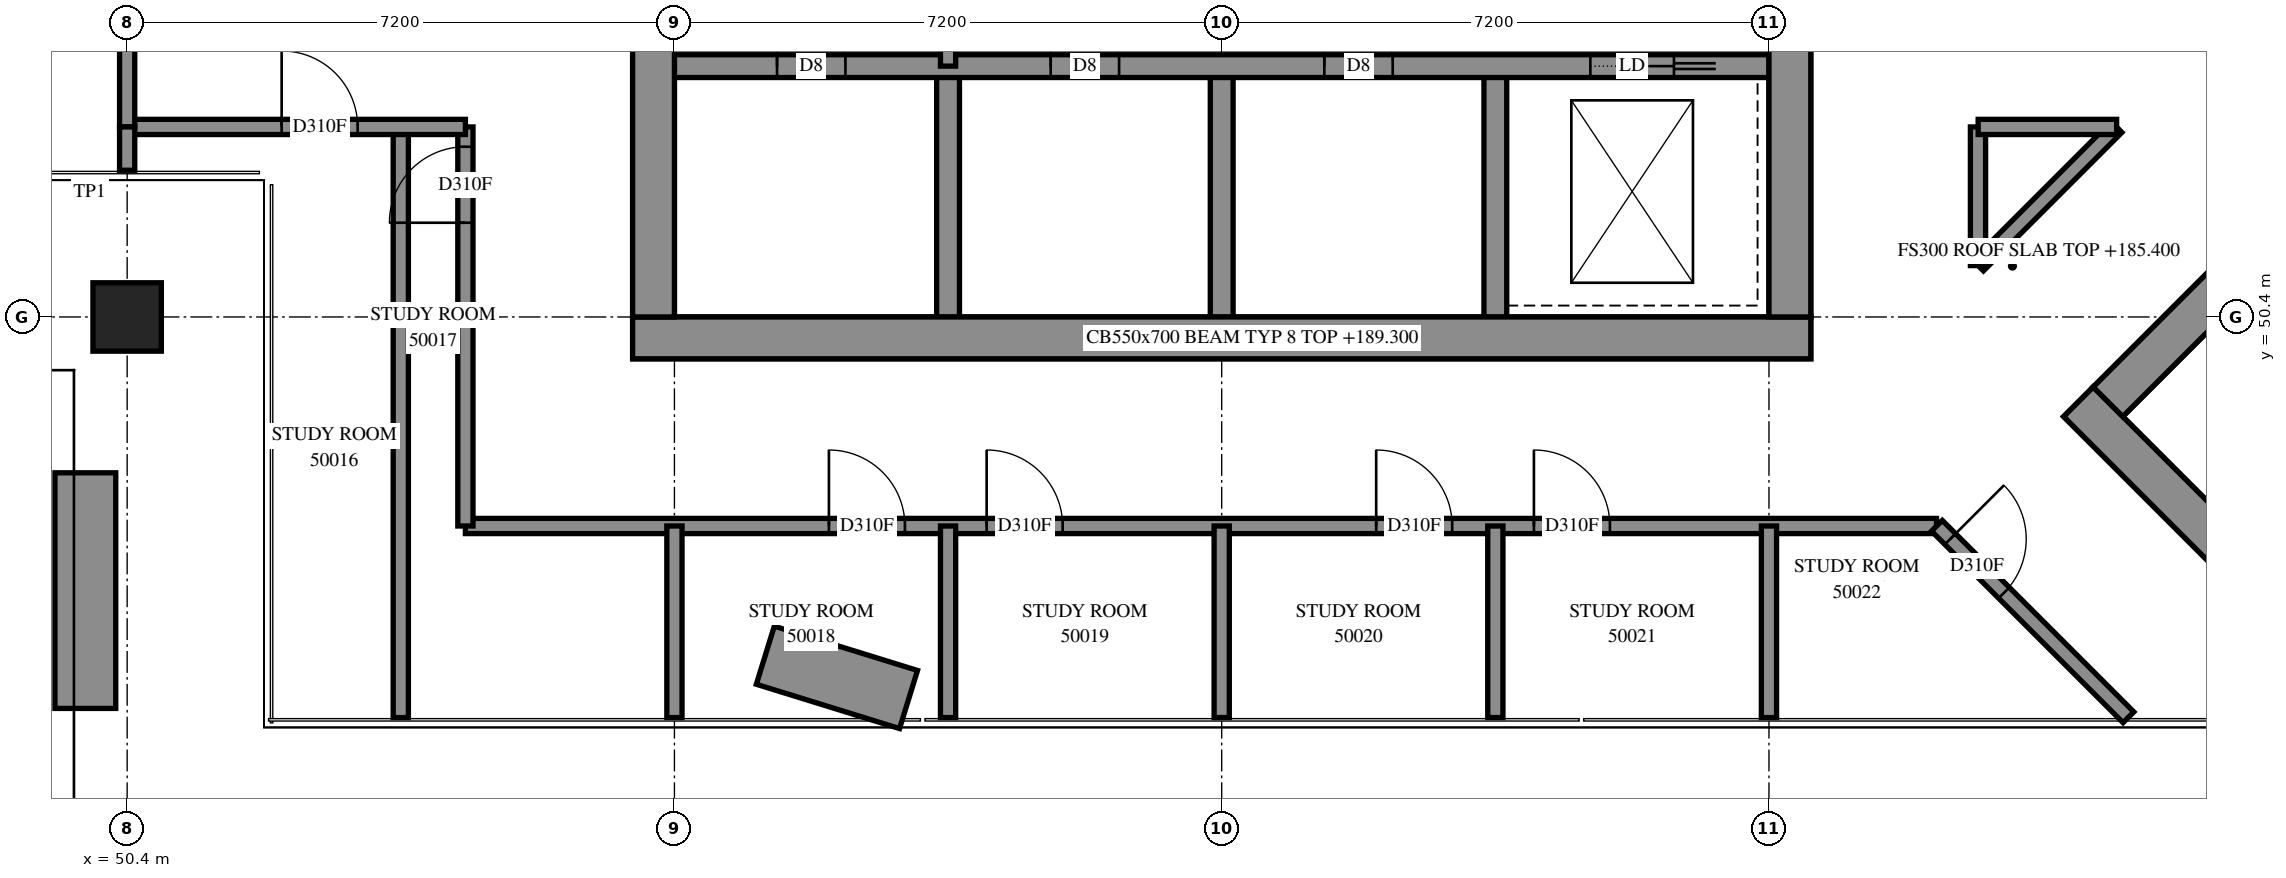
"""IFC4 building model, lengths in metres.
Left out: names, types, materials, properties, quantities, classifications, styles, units other than length and angle.
Written with IfcOpenShell. Run it as: python <this file> out.ifc"""

import sys

from ifc_helpers import new_model, si_unit, direction, frame, frame_2d, origin, origin_2d, place, context, subcontext, project, spatial, rectangle, extrude, element, fill, save


model = new_model("IFC4")
c1 = context("Model", 3, precision=1e-05, world=origin(), true_north=direction((0.0, 1.0)))
c2 = subcontext(c1, "Body", "Model", "MODEL_VIEW")
j1 = project(units=[si_unit("LENGTHUNIT", "METRE"), si_unit("PLANEANGLEUNIT", "RADIAN")], contexts=[c1])
p1 = place(None, origin())
s1 = spatial("IfcSite", under=j1, at=p1, CompositionType="ELEMENT")
p2 = place(p1, origin())
s2 = spatial("IfcBuilding", under=s1, at=p2, CompositionType="ELEMENT")
p3 = place(p2, frame((0.0, 0.0, 185.4)))
s3 = spatial("IfcBuildingStorey", under=s2, at=p3, CompositionType="ELEMENT", Elevation=185.4)
p4 = place(p3, frame((50.4, 50.4, 0.0), z_axis=(0.0, 0.0, 1.0), x_axis=(1.0, 0.0, 0.0)))
e1 = element("IfcColumn", 1, at=p4, inside=s3, PredefinedType="COLUMN", context=c2, shape_type="SweptSolid", body=[
    extrude(rectangle(XDim=0.9, YDim=0.9, at=origin_2d()), origin(), (0.0, 0.0, 1.0), 3.9),
])
p5 = place(p3, frame((57.05, 50.125, -0.3), z_axis=(0.0, 0.0, 1.0), x_axis=(1.0, 0.0, 0.0)))
e2 = element("IfcWall", 2, at=p5, inside=s3, PredefinedType="SHEAR", context=c2, shape_type="SweptSolid", body=[
    extrude(rectangle(XDim=15.5, YDim=0.55, at=frame_2d((7.75, 0.0))), origin(), (0.0, 0.0, 1.0), 3.5),
])
p6 = place(p3, frame((57.325, 50.4, -0.3), z_axis=(0.0, 0.0, 1.0), x_axis=(0.0, 1.0, 0.0)))
e3 = element("IfcWall", 3, at=p6, inside=s3, PredefinedType="SHEAR", context=c2, shape_type="SweptSolid", body=[
    extrude(rectangle(XDim=14.4, YDim=0.55, at=frame_2d((7.2, 0.0))), origin(), (0.0, 0.0, 1.0), 3.5),
])
p7 = place(p6, frame((4.55, 0.0, 0.3)))
e4 = element("IfcOpeningElement", 4, at=p7, cuts=e3, PredefinedType="OPENING", context=c2, shape_type="SweptSolid", body=[
    extrude(rectangle(XDim=1.1, YDim=2.1, at=frame_2d((0.55, 1.05))), frame((0.0, 0.285, 0.0), z_axis=(0.0, -1.0, 0.0), x_axis=(1.0, 0.0, 0.0)), (0.0, 0.0, 1.0), 0.57),
])
p8 = place(p6, frame((11.35, 0.0, 0.3)))
e5 = element("IfcOpeningElement", 5, at=p8, cuts=e3, PredefinedType="OPENING", context=c2, shape_type="SweptSolid", body=[
    extrude(rectangle(XDim=1.1, YDim=2.1, at=frame_2d((0.55, 1.05))), frame((0.0, 0.285, 0.0), z_axis=(0.0, -1.0, 0.0), x_axis=(1.0, 0.0, 0.0)), (0.0, 0.0, 1.0), 0.57),
])
p9 = place(p3, frame((72.275, 50.4, -0.3), z_axis=(0.0, 0.0, 1.0), x_axis=(0.0, 1.0, 0.0)))
e6 = element("IfcWall", 6, at=p9, inside=s3, PredefinedType="SHEAR", context=c2, shape_type="SweptSolid", body=[
    extrude(rectangle(XDim=14.4, YDim=0.55, at=frame_2d((7.2, 0.0))), origin(), (0.0, 0.0, 1.0), 3.5),
])
p10 = place(p9, frame((4.55, 0.0, 0.3)))
e7 = element("IfcOpeningElement", 7, at=p10, cuts=e6, PredefinedType="OPENING", context=c2, shape_type="SweptSolid", body=[
    extrude(rectangle(XDim=1.1, YDim=2.1, at=frame_2d((0.55, 1.05))), frame((0.0, 0.285, 0.0), z_axis=(0.0, -1.0, 0.0), x_axis=(1.0, 0.0, 0.0)), (0.0, 0.0, 1.0), 0.57),
])
p11 = place(p9, frame((11.35, 0.0, 0.3)))
e8 = element("IfcOpeningElement", 8, at=p11, cuts=e6, PredefinedType="OPENING", context=c2, shape_type="SweptSolid", body=[
    extrude(rectangle(XDim=1.1, YDim=2.1, at=frame_2d((0.55, 1.05))), frame((0.0, 0.285, 0.0), z_axis=(0.0, -1.0, 0.0), x_axis=(1.0, 0.0, 0.0)), (0.0, 0.0, 1.0), 0.57),
])
for number, where, z_axis, x_axis in (
    (9, (61.2, 50.4, 0.0), (0.0, 0.0, 1.0), (0.0, 1.0, 0.0)),
    (10, (64.8, 50.4, 0.0), (0.0, 0.0, 1.0), (0.0, 1.0, 0.0)),
    (11, (68.4, 50.4, 0.0), (0.0, 0.0, 1.0), (0.0, 1.0, 0.0)),
):
    element("IfcWall", number, at=place(p3, frame(where, z_axis=z_axis, x_axis=x_axis)), inside=s3, PredefinedType="SOLIDWALL", context=c2, shape_type="SweptSolid", body=[
        extrude(rectangle(XDim=3.3, YDim=0.3, at=frame_2d((1.65, 0.0))), origin(), (0.0, 0.0, 1.0), 3.9),
    ])
p12 = place(p3, frame((57.6, 53.7, 0.0), z_axis=(0.0, 0.0, 1.0), x_axis=(1.0, 0.0, 0.0)))
e12 = element("IfcWall", 12, at=p12, inside=s3, PredefinedType="SOLIDWALL", context=c2, shape_type="SweptSolid", body=[
    extrude(rectangle(XDim=14.4, YDim=0.3, at=frame_2d((7.2, 0.0))), origin(), (0.0, 0.0, 1.0), 3.9),
])
p13 = place(p12, frame((1.35, 0.0, 0.0)))
e13 = element("IfcOpeningElement", 13, at=p13, cuts=e12, PredefinedType="OPENING", context=c2, shape_type="SweptSolid", body=[
    extrude(rectangle(XDim=0.9, YDim=2.1, at=frame_2d((0.45, 1.05))), frame((0.0, 0.16, 0.0), z_axis=(0.0, -1.0, 0.0), x_axis=(1.0, 0.0, 0.0)), (0.0, 0.0, 1.0), 0.32),
])
p14 = place(p12, frame((4.95, 0.0, 0.0)))
e14 = element("IfcOpeningElement", 14, at=p14, cuts=e12, PredefinedType="OPENING", context=c2, shape_type="SweptSolid", body=[
    extrude(rectangle(XDim=0.9, YDim=2.1, at=frame_2d((0.45, 1.05))), frame((0.0, 0.16, 0.0), z_axis=(0.0, -1.0, 0.0), x_axis=(1.0, 0.0, 0.0)), (0.0, 0.0, 1.0), 0.32),
])
p15 = place(p12, frame((8.55, 0.0, 0.0)))
e15 = element("IfcOpeningElement", 15, at=p15, cuts=e12, PredefinedType="OPENING", context=c2, shape_type="SweptSolid", body=[
    extrude(rectangle(XDim=0.9, YDim=2.1, at=frame_2d((0.45, 1.05))), frame((0.0, 0.16, 0.0), z_axis=(0.0, -1.0, 0.0), x_axis=(1.0, 0.0, 0.0)), (0.0, 0.0, 1.0), 0.32),
])
p16 = place(p12, frame((12.05, 0.0, 0.0)))
e16 = element("IfcOpeningElement", 16, at=p16, cuts=e12, PredefinedType="OPENING", context=c2, shape_type="SweptSolid", body=[
    extrude(rectangle(XDim=1.1, YDim=2.1, at=frame_2d((0.55, 1.05))), frame((0.0, 0.16, 0.0), z_axis=(0.0, -1.0, 0.0), x_axis=(1.0, 0.0, 0.0)), (0.0, 0.0, 1.0), 0.32),
])
p17 = place(p3, frame((76.071, 49.284, -0.3), z_axis=(0.0, 0.0, 1.0), x_axis=(0.7071035554, -0.707110007, 0.0)))
e17 = element("IfcWall", 17, at=p17, inside=s3, PredefinedType="SHEAR", context=c2, shape_type="SweptSolid", body=[
    extrude(rectangle(XDim=15.5, YDim=0.55, at=frame_2d((7.75, 0.0))), origin(), (0.0, 0.0, 1.0), 3.5),
])
p18 = place(p3, frame((76.46, 49.284, -0.3), z_axis=(0.0, 0.0, 1.0), x_axis=(0.7071067812, 0.7071067812, 0.0)))
e18 = element("IfcWall", 18, at=p18, inside=s3, PredefinedType="SHEAR", context=c2, shape_type="SweptSolid", body=[
    extrude(rectangle(XDim=14.4, YDim=0.55, at=frame_2d((7.2, 0.0))), origin(), (0.0, 0.0, 1.0), 3.5),
])
p19 = place(p18, frame((4.55, 0.0, 0.3)))
e19 = element("IfcOpeningElement", 19, at=p19, cuts=e18, PredefinedType="OPENING", context=c2, shape_type="SweptSolid", body=[
    extrude(rectangle(XDim=1.1, YDim=2.1, at=frame_2d((0.55, 1.05))), frame((0.0, 0.285, 0.0), z_axis=(0.0, -1.0, 0.0), x_axis=(1.0, 0.0, 0.0)), (0.0, 0.0, 1.0), 0.57),
])
p20 = place(p18, frame((11.35, 0.0, 0.3)))
e20 = element("IfcOpeningElement", 20, at=p20, cuts=e18, PredefinedType="OPENING", context=c2, shape_type="SweptSolid", body=[
    extrude(rectangle(XDim=1.1, YDim=2.1, at=frame_2d((0.55, 1.05))), frame((0.0, 0.285, 0.0), z_axis=(0.0, -1.0, 0.0), x_axis=(1.0, 0.0, 0.0)), (0.0, 0.0, 1.0), 0.57),
])
p21 = place(p3, frame((49.85, 48.35, 0.0), z_axis=(0.0, 0.0, 1.0), x_axis=(0.0, -1.0, 0.0)))
e21 = element("IfcWall", 21, at=p21, inside=s3, PredefinedType="SOLIDWALL", context=c2, shape_type="SweptSolid", body=[
    extrude(rectangle(XDim=3.1, YDim=0.8, at=frame_2d((1.55, 0.0))), origin(), (0.0, 0.0, 1.0), 0.65),
])
p22 = place(p3, frame((60.68, 45.367, 0.0), z_axis=(0.0, 0.0, 1.0), x_axis=(-0.9553537272, 0.2954644747, 0.0)))
e22 = element("IfcWall", 22, at=p22, inside=s3, PredefinedType="SOLIDWALL", context=c2, shape_type="SweptSolid", body=[
    extrude(rectangle(XDim=1.972, YDim=0.8, at=frame_2d((0.986, 0.0))), origin(), (0.0, 0.0, 1.0), 0.65),
])
p23 = place(p3, frame((61.2, 53.7, 0.0), z_axis=(0.0, 0.0, 1.0), x_axis=(0.0, 1.0, 0.0)))
e23 = element("IfcWall", 23, at=p23, inside=s3, PredefinedType="PARTITIONING", context=c2, shape_type="SweptSolid", body=[
    extrude(rectangle(XDim=3.6, YDim=0.2, at=frame_2d((1.8, 0.0))), origin(), (0.0, 0.0, 1.0), 3.9),
])
p24 = place(p3, frame((54.85, 47.65, 0.0), z_axis=(0.0, 0.0, 1.0), x_axis=(1.0, 0.0, 0.0)))
e24 = element("IfcWall", 24, at=p24, inside=s3, PredefinedType="PARTITIONING", context=c2, shape_type="SweptSolid", body=[
    extrude(rectangle(XDim=19.354, YDim=0.2, at=frame_2d((9.677, 0.0))), origin(), (0.0, 0.0, 1.0), 3.9),
])
p25 = place(p24, frame((4.782, 0.0, 0.0)))
e25 = element("IfcOpeningElement", 25, at=p25, cuts=e24, PredefinedType="OPENING", context=c2, shape_type="SweptSolid", body=[
    extrude(rectangle(XDim=1.0, YDim=2.1, at=frame_2d((0.5, 1.05))), frame((0.0, 0.11, 0.0), z_axis=(0.0, -1.0, 0.0), x_axis=(1.0, 0.0, 0.0)), (0.0, 0.0, 1.0), 0.22),
])
p26 = place(p24, frame((6.857, 0.0, 0.0)))
e26 = element("IfcOpeningElement", 26, at=p26, cuts=e24, PredefinedType="OPENING", context=c2, shape_type="SweptSolid", body=[
    extrude(rectangle(XDim=1.0, YDim=2.1, at=frame_2d((0.5, 1.05))), frame((0.0, 0.11, 0.0), z_axis=(0.0, -1.0, 0.0), x_axis=(1.0, 0.0, 0.0)), (0.0, 0.0, 1.0), 0.22),
])
p27 = place(p24, frame((11.982, 0.0, 0.0)))
e27 = element("IfcOpeningElement", 27, at=p27, cuts=e24, PredefinedType="OPENING", context=c2, shape_type="SweptSolid", body=[
    extrude(rectangle(XDim=1.0, YDim=2.1, at=frame_2d((0.5, 1.05))), frame((0.0, 0.11, 0.0), z_axis=(0.0, -1.0, 0.0), x_axis=(1.0, 0.0, 0.0)), (0.0, 0.0, 1.0), 0.22),
])
p28 = place(p24, frame((14.057, 0.0, 0.0)))
e28 = element("IfcOpeningElement", 28, at=p28, cuts=e24, PredefinedType="OPENING", context=c2, shape_type="SweptSolid", body=[
    extrude(rectangle(XDim=1.0, YDim=2.1, at=frame_2d((0.5, 1.05))), frame((0.0, 0.11, 0.0), z_axis=(0.0, -1.0, 0.0), x_axis=(1.0, 0.0, 0.0)), (0.0, 0.0, 1.0), 0.22),
])
p29 = place(p3, frame((54.0, 45.13, 0.0), z_axis=(0.0, 0.0, 1.0), x_axis=(0.0, 1.0, 0.0)))
e29 = element("IfcWall", 29, at=p29, inside=s3, PredefinedType="PARTITIONING", context=c2, shape_type="SweptSolid", body=[
    extrude(rectangle(XDim=7.77, YDim=0.2, at=frame_2d((3.885, 0.0))), origin(), (0.0, 0.0, 1.0), 3.9),
])
p30 = place(p3, frame((54.85, 47.65, 0.0), z_axis=(0.0, 0.0, 1.0), x_axis=(0.0, 1.0, 0.0)))
e30 = element("IfcWall", 30, at=p30, inside=s3, PredefinedType="PARTITIONING", context=c2, shape_type="SweptSolid", body=[
    extrude(rectangle(XDim=5.25, YDim=0.2, at=frame_2d((2.625, 0.0))), origin(), (0.0, 0.0, 1.0), 3.9),
])
p31 = place(p30, frame((3.99, 0.0, 0.0)))
e31 = element("IfcOpeningElement", 31, at=p31, cuts=e30, PredefinedType="OPENING", context=c2, shape_type="SweptSolid", body=[
    extrude(rectangle(XDim=1.0, YDim=2.1, at=frame_2d((0.5, 1.05))), frame((0.0, 0.11, 0.0), z_axis=(0.0, -1.0, 0.0), x_axis=(1.0, 0.0, 0.0)), (0.0, 0.0, 1.0), 0.22),
])
p32 = place(p3, frame((50.4, 52.9, 0.0), z_axis=(0.0, 0.0, 1.0), x_axis=(1.0, 0.0, 0.0)))
e32 = element("IfcWall", 32, at=p32, inside=s3, PredefinedType="PARTITIONING", context=c2, shape_type="SweptSolid", body=[
    extrude(rectangle(XDim=4.45, YDim=0.2, at=frame_2d((2.225, 0.0))), origin(), (0.0, 0.0, 1.0), 3.9),
])
p33 = place(p32, frame((2.033, 0.0, 0.0)))
e33 = element("IfcOpeningElement", 33, at=p33, cuts=e32, PredefinedType="OPENING", context=c2, shape_type="SweptSolid", body=[
    extrude(rectangle(XDim=1.0, YDim=2.1, at=frame_2d((0.5, 1.05))), frame((0.0, 0.11, 0.0), z_axis=(0.0, -1.0, 0.0), x_axis=(1.0, 0.0, 0.0)), (0.0, 0.0, 1.0), 0.22),
])
p34 = place(p3, frame((74.209, 47.653, 0.0), z_axis=(0.0, 0.0, 1.0), x_axis=(0.7071067812, -0.7071067812, 0.0)))
e34 = element("IfcWall", 34, at=p34, inside=s3, PredefinedType="PARTITIONING", context=c2, shape_type="SweptSolid", body=[
    extrude(rectangle(XDim=3.564, YDim=0.2, at=frame_2d((1.782, 0.0))), origin(), (0.0, 0.0, 1.0), 3.9),
])
p35 = place(p34, frame((0.248, 0.0, 0.0)))
e35 = element("IfcOpeningElement", 35, at=p35, cuts=e34, PredefinedType="OPENING", context=c2, shape_type="SweptSolid", body=[
    extrude(rectangle(XDim=1.0, YDim=2.1, at=frame_2d((0.5, 1.05))), frame((0.0, 0.11, 0.0), z_axis=(0.0, -1.0, 0.0), x_axis=(1.0, 0.0, 0.0)), (0.0, 0.0, 1.0), 0.22),
])
p36 = place(p3, frame((74.751, 51.077, 0.0), z_axis=(0.0, 0.0, 1.0), x_axis=(0.7071067812, 0.7071067812, 0.0)))
e36 = element("IfcWall", 36, at=p36, inside=s3, PredefinedType="PARTITIONING", context=c2, shape_type="SweptSolid", body=[
    extrude(rectangle(XDim=2.577, YDim=0.2, at=frame_2d((1.288, 0.0))), origin(), (0.0, 0.0, 1.0), 3.9),
])
for number, where, z_axis, x_axis in (
    (37, (57.6, 45.13, 0.0), (0.0, 0.0, 1.0), (0.0, 1.0, 0.0)),
    (38, (61.2, 45.13, 0.0), (0.0, 0.0, 1.0), (0.0, 1.0, 0.0)),
    (39, (64.8, 45.13, 0.0), (0.0, 0.0, 1.0), (0.0, 1.0, 0.0)),
    (40, (68.4, 45.13, 0.0), (0.0, 0.0, 1.0), (0.0, 1.0, 0.0)),
    (41, (72.0, 45.13, 0.0), (0.0, 0.0, 1.0), (0.0, 1.0, 0.0)),
):
    element("IfcWall", number, at=place(p3, frame(where, z_axis=z_axis, x_axis=x_axis)), inside=s3, PredefinedType="PARTITIONING", context=c2, shape_type="SweptSolid", body=[
        extrude(rectangle(XDim=2.52, YDim=0.2, at=frame_2d((1.26, 0.0))), origin(), (0.0, 0.0, 1.0), 3.9),
    ])
p37 = place(p3, frame((50.4, 52.9, 0.0), z_axis=(0.0, 0.0, 1.0), x_axis=(0.0, 1.0, 0.0)))
e42 = element("IfcWall", 42, at=p37, inside=s3, PredefinedType="PARTITIONING", context=c2, shape_type="SweptSolid", body=[
    extrude(rectangle(XDim=2.2, YDim=0.2, at=frame_2d((1.1, 0.0))), origin(), (0.0, 0.0, 1.0), 3.9),
])
p38 = place(p3, frame((74.75, 51.076, 0.0), z_axis=(0.0, 0.0, 1.0), x_axis=(0.0, 1.0, 0.0)))
e43 = element("IfcWall", 43, at=p38, inside=s3, PredefinedType="PARTITIONING", context=c2, shape_type="SweptSolid", body=[
    extrude(rectangle(XDim=1.824, YDim=0.2, at=frame_2d((0.912, 0.0))), origin(), (0.0, 0.0, 1.0), 3.9),
])
p39 = place(p3, frame((74.752, 52.9, 0.0), z_axis=(0.0, 0.0, 1.0), x_axis=(1.0, 0.0, 0.0)))
e44 = element("IfcWall", 44, at=p39, inside=s3, PredefinedType="PARTITIONING", context=c2, shape_type="SweptSolid", body=[
    extrude(rectangle(XDim=1.822, YDim=0.2, at=frame_2d((0.911, 0.0))), origin(), (0.0, 0.0, 1.0), 3.9),
])
p40 = place(p3, frame((50.4, 52.33, 0.0), z_axis=(0.0, 0.0, 1.0), x_axis=(0.0, 1.0, 0.0)))
e45 = element("IfcWall", 45, at=p40, inside=s3, PredefinedType="PARTITIONING", context=c2, shape_type="SweptSolid", body=[
    extrude(rectangle(XDim=0.57, YDim=0.2, at=frame_2d((0.285, 0.0))), origin(), (0.0, 0.0, 1.0), 3.9),
])
p41 = place(p13, origin())
e46 = element("IfcDoor", 46, at=p41, inside=s3, OperationType="SINGLE_SWING_LEFT", PredefinedType="DOOR", context=c2, shape_type="SweptSolid", body=[
    extrude(rectangle(XDim=0.9, YDim=2.1, at=frame_2d((0.45, 1.05))), frame((0.0, 0.025, 0.0), z_axis=(0.0, -1.0, 0.0), x_axis=(1.0, 0.0, 0.0)), (0.0, 0.0, 1.0), 0.05),
])
fill(e13, e46)
p42 = place(p14, origin())
e47 = element("IfcDoor", 47, at=p42, inside=s3, OperationType="SINGLE_SWING_LEFT", PredefinedType="DOOR", context=c2, shape_type="SweptSolid", body=[
    extrude(rectangle(XDim=0.9, YDim=2.1, at=frame_2d((0.45, 1.05))), frame((0.0, 0.025, 0.0), z_axis=(0.0, -1.0, 0.0), x_axis=(1.0, 0.0, 0.0)), (0.0, 0.0, 1.0), 0.05),
])
fill(e14, e47)
p43 = place(p15, origin())
e48 = element("IfcDoor", 48, at=p43, inside=s3, OperationType="SINGLE_SWING_LEFT", PredefinedType="DOOR", context=c2, shape_type="SweptSolid", body=[
    extrude(rectangle(XDim=0.9, YDim=2.1, at=frame_2d((0.45, 1.05))), frame((0.0, 0.025, 0.0), z_axis=(0.0, -1.0, 0.0), x_axis=(1.0, 0.0, 0.0)), (0.0, 0.0, 1.0), 0.05),
])
fill(e15, e48)
p44 = place(p16, origin())
e49 = element("IfcDoor", 49, at=p44, inside=s3, OperationType="SLIDING_TO_RIGHT", PredefinedType="DOOR", context=c2, shape_type="SweptSolid", body=[
    extrude(rectangle(XDim=1.1, YDim=2.1, at=frame_2d((0.55, 1.05))), frame((0.0, 0.025, 0.0), z_axis=(0.0, -1.0, 0.0), x_axis=(1.0, 0.0, 0.0)), (0.0, 0.0, 1.0), 0.05),
])
fill(e16, e49)
p45 = place(p33, origin())
e50 = element("IfcDoor", 50, at=p45, inside=s3, OperationType="SINGLE_SWING_LEFT", PredefinedType="DOOR", context=c2, shape_type="SweptSolid", body=[
    extrude(rectangle(XDim=1.0, YDim=2.1, at=frame_2d((0.5, 1.05))), frame((0.0, 0.025, 0.0), z_axis=(0.0, -1.0, 0.0), x_axis=(1.0, 0.0, 0.0)), (0.0, 0.0, 1.0), 0.05),
])
fill(e33, e50)
p46 = place(p31, origin())
e51 = element("IfcDoor", 51, at=p46, inside=s3, OperationType="SINGLE_SWING_RIGHT", PredefinedType="DOOR", context=c2, shape_type="SweptSolid", body=[
    extrude(rectangle(XDim=1.0, YDim=2.1, at=frame_2d((0.5, 1.05))), frame((0.0, 0.025, 0.0), z_axis=(0.0, -1.0, 0.0), x_axis=(1.0, 0.0, 0.0)), (0.0, 0.0, 1.0), 0.05),
])
fill(e31, e51)
p47 = place(p25, origin())
e52 = element("IfcDoor", 52, at=p47, inside=s3, OperationType="SINGLE_SWING_LEFT", PredefinedType="DOOR", context=c2, shape_type="SweptSolid", body=[
    extrude(rectangle(XDim=1.0, YDim=2.1, at=frame_2d((0.5, 1.05))), frame((0.0, 0.025, 0.0), z_axis=(0.0, -1.0, 0.0), x_axis=(1.0, 0.0, 0.0)), (0.0, 0.0, 1.0), 0.05),
])
fill(e25, e52)
p48 = place(p26, origin())
e53 = element("IfcDoor", 53, at=p48, inside=s3, OperationType="SINGLE_SWING_RIGHT", PredefinedType="DOOR", context=c2, shape_type="SweptSolid", body=[
    extrude(rectangle(XDim=1.0, YDim=2.1, at=frame_2d((0.5, 1.05))), frame((0.0, 0.025, 0.0), z_axis=(0.0, -1.0, 0.0), x_axis=(1.0, 0.0, 0.0)), (0.0, 0.0, 1.0), 0.05),
])
fill(e26, e53)
p49 = place(p27, origin())
e54 = element("IfcDoor", 54, at=p49, inside=s3, OperationType="SINGLE_SWING_LEFT", PredefinedType="DOOR", context=c2, shape_type="SweptSolid", body=[
    extrude(rectangle(XDim=1.0, YDim=2.1, at=frame_2d((0.5, 1.05))), frame((0.0, 0.025, 0.0), z_axis=(0.0, -1.0, 0.0), x_axis=(1.0, 0.0, 0.0)), (0.0, 0.0, 1.0), 0.05),
])
fill(e27, e54)
p50 = place(p28, origin())
e55 = element("IfcDoor", 55, at=p50, inside=s3, OperationType="SINGLE_SWING_RIGHT", PredefinedType="DOOR", context=c2, shape_type="SweptSolid", body=[
    extrude(rectangle(XDim=1.0, YDim=2.1, at=frame_2d((0.5, 1.05))), frame((0.0, 0.025, 0.0), z_axis=(0.0, -1.0, 0.0), x_axis=(1.0, 0.0, 0.0)), (0.0, 0.0, 1.0), 0.05),
])
fill(e28, e55)
p51 = place(p35, origin())
e56 = element("IfcDoor", 56, at=p51, inside=s3, OperationType="SINGLE_SWING_LEFT", PredefinedType="DOOR", context=c2, shape_type="SweptSolid", body=[
    extrude(rectangle(XDim=1.0, YDim=2.1, at=frame_2d((0.5, 1.05))), frame((0.0, 0.025, 0.0), z_axis=(0.0, -1.0, 0.0), x_axis=(1.0, 0.0, 0.0)), (0.0, 0.0, 1.0), 0.05),
])
fill(e35, e56)
save(model, sys.argv[1])
